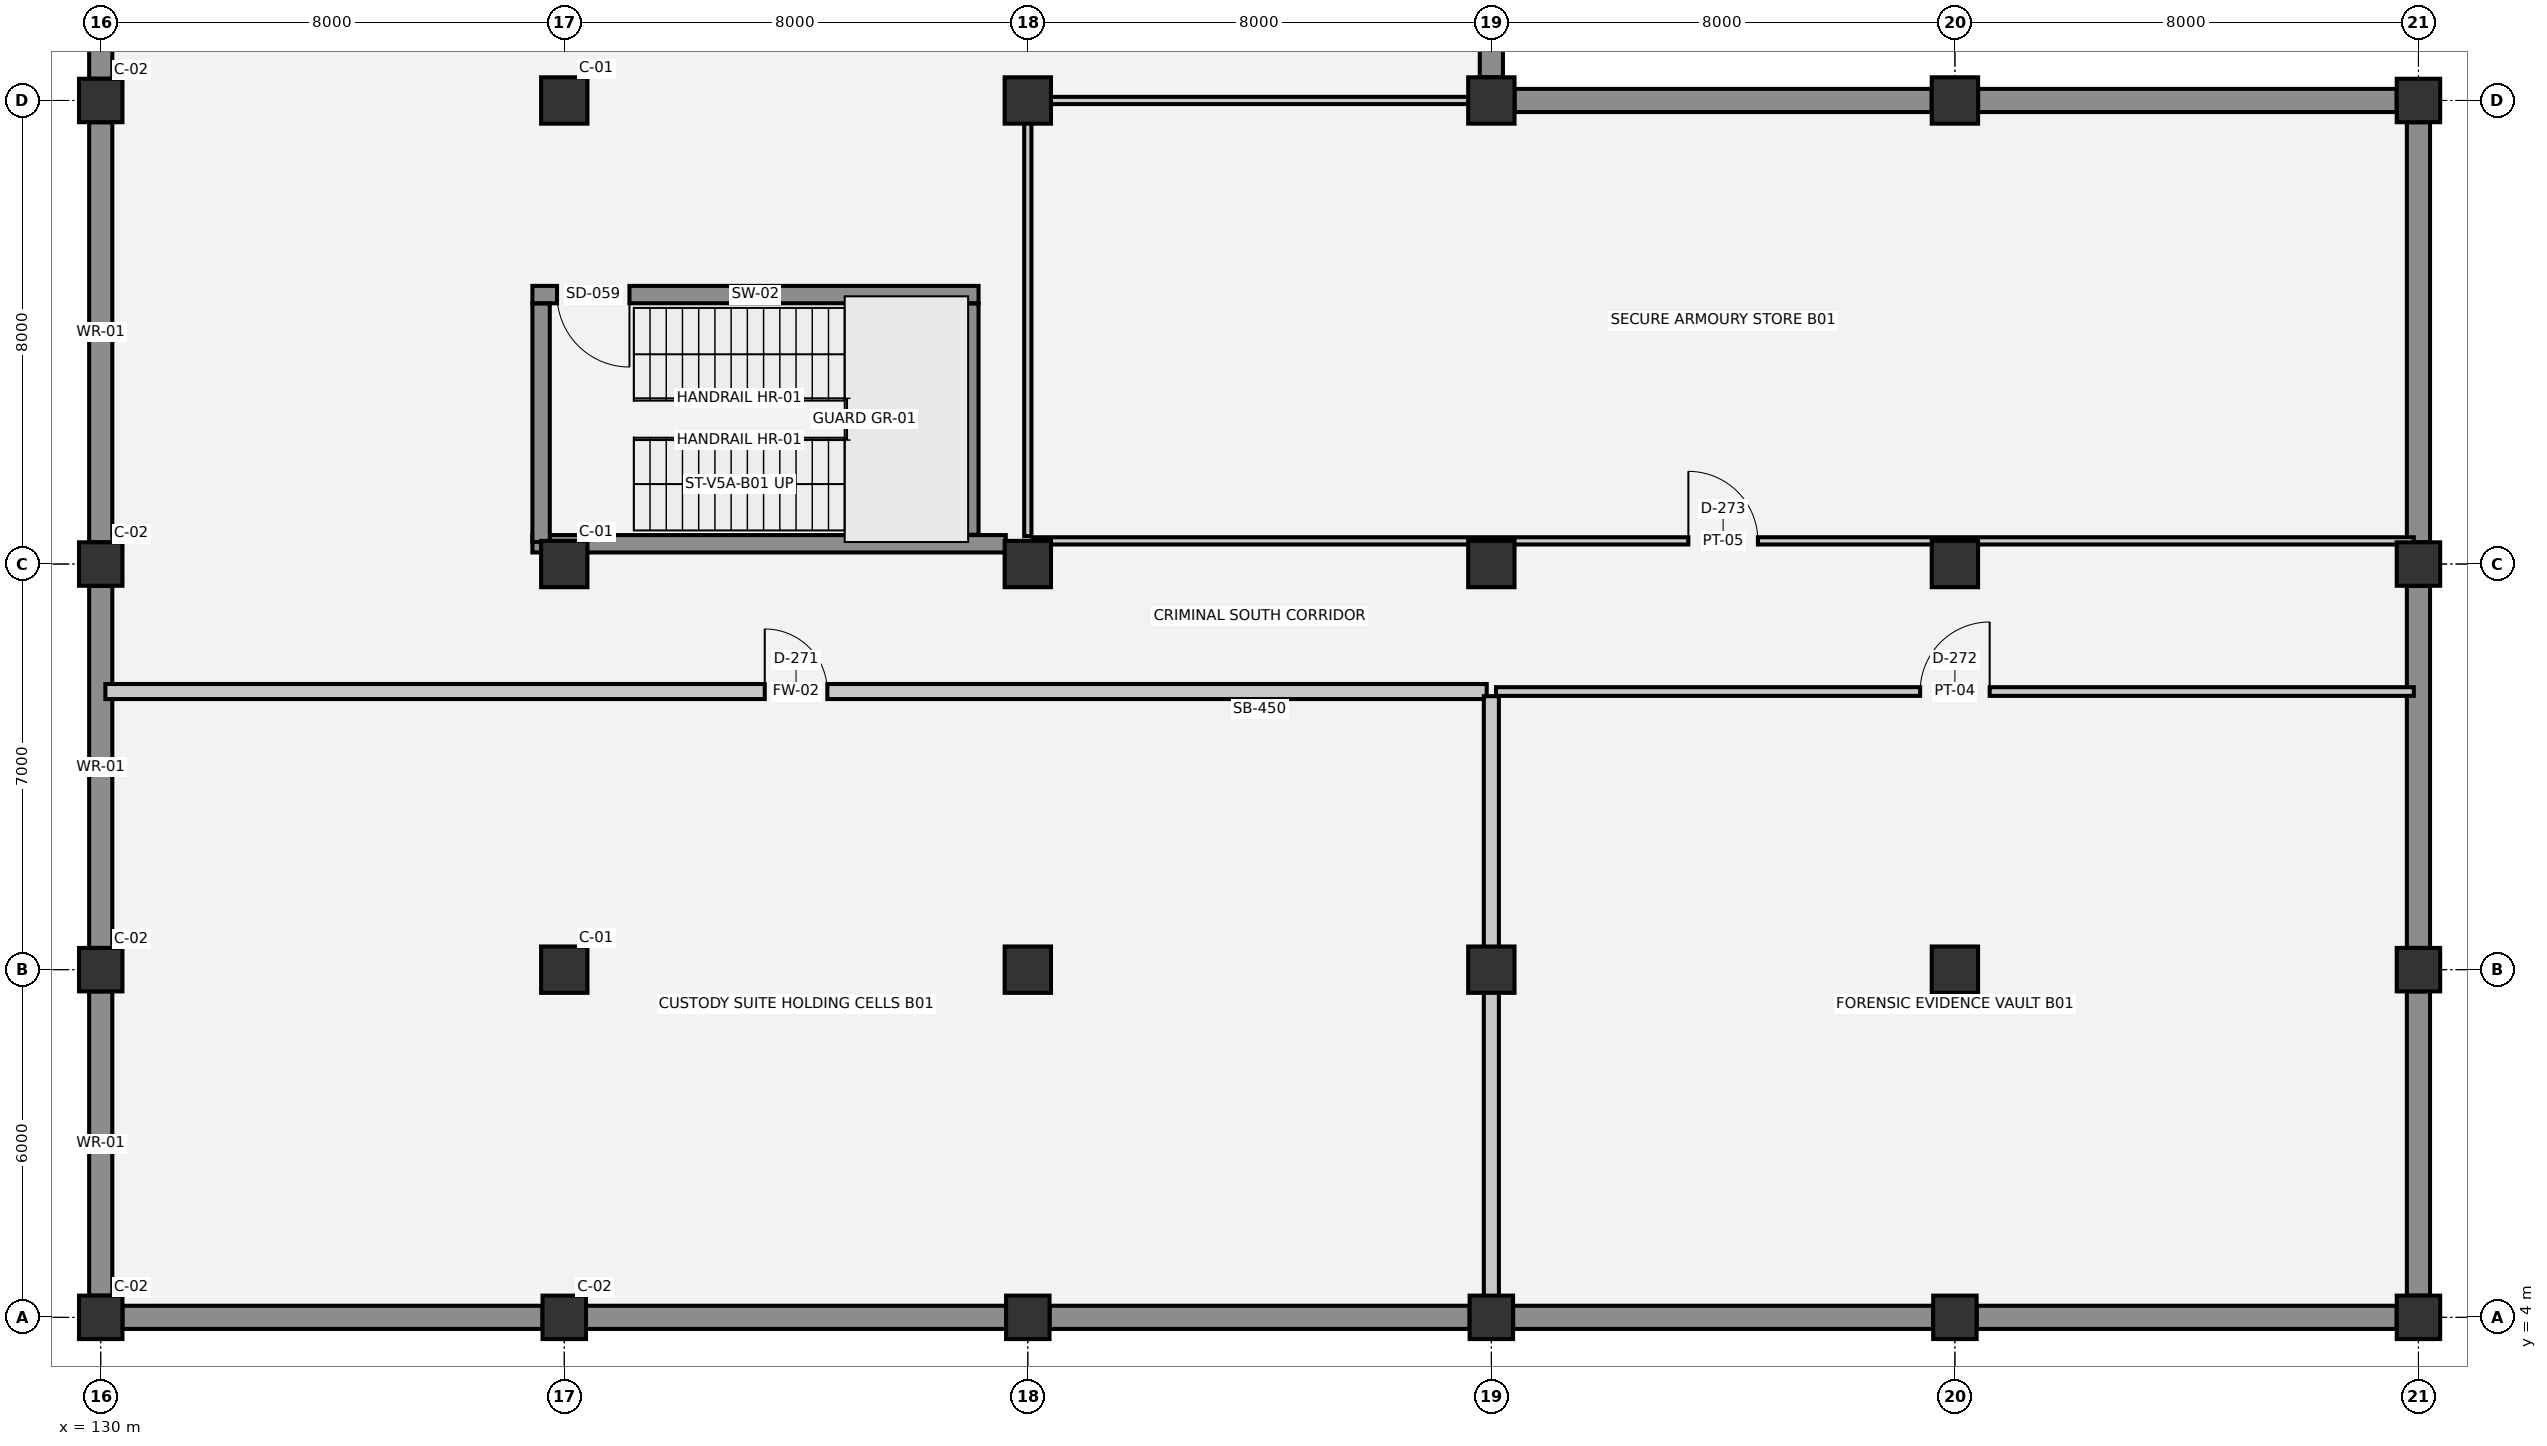
"""IFC4 building model, lengths in metres.
Left out: names, types, materials, properties, quantities, classifications, styles, units other than length and angle.
Written with IfcOpenShell. Run it as: python <this file> out.ifc"""

import sys

from ifc_helpers import new_model, si_unit, direction, frame, frame_2d, origin, origin_2d, place, context, subcontext, project, spatial, rectangle, extrude, element, fill, save


model = new_model("IFC4")
c1 = context("Model", 3, precision=1e-05, world=origin(), true_north=direction((0.0, 1.0)))
c2 = subcontext(c1, "Body", "Model", "MODEL_VIEW")
j1 = project(units=[si_unit("LENGTHUNIT", "METRE"), si_unit("PLANEANGLEUNIT", "RADIAN")], contexts=[c1])
p1 = place(None, origin())
s1 = spatial("IfcSite", under=j1, at=p1, CompositionType="ELEMENT")
p2 = place(p1, origin())
s2 = spatial("IfcBuilding", under=s1, at=p2, CompositionType="ELEMENT")
p3 = place(p2, frame((0.0, 0.0, -4.5)))
s3 = spatial("IfcBuildingStorey", under=s2, at=p3, CompositionType="ELEMENT", Elevation=-4.5)
for number, where, z_axis, x_axis in (
    (1, (130.0, 4.0, 0.0), (0.0, 0.0, 1.0), (1.0, 0.0, 0.0)),
    (2, (130.0, 10.0, 0.0), (0.0, 0.0, 1.0), (1.0, 0.0, 0.0)),
    (3, (130.0, 17.0, 0.0), (0.0, 0.0, 1.0), (1.0, 0.0, 0.0)),
    (4, (130.0, 25.0, 0.0), (0.0, 0.0, 1.0), (1.0, 0.0, 0.0)),
    (5, (138.0, 4.0, 0.0), (0.0, 0.0, 1.0), (1.0, 0.0, 0.0)),
):
    element("IfcColumn", number, at=place(p3, frame(where, z_axis=z_axis, x_axis=x_axis)), inside=s3, PredefinedType="COLUMN", context=c2, shape_type="SweptSolid", body=[
        extrude(rectangle(XDim=0.75, YDim=0.75, at=origin_2d()), origin(), (0.0, 0.0, 1.0), 4.5),
    ])
for number, where, z_axis, x_axis in (
    (6, (138.0, 10.0, 0.0), (0.0, 0.0, 1.0), (1.0, 0.0, 0.0)),
    (7, (138.0, 17.0, 0.0), (0.0, 0.0, 1.0), (1.0, 0.0, 0.0)),
    (8, (138.0, 25.0, 0.0), (0.0, 0.0, 1.0), (1.0, 0.0, 0.0)),
):
    element("IfcColumn", number, at=place(p3, frame(where, z_axis=z_axis, x_axis=x_axis)), inside=s3, PredefinedType="COLUMN", context=c2, shape_type="SweptSolid", body=[
        extrude(rectangle(XDim=0.8, YDim=0.8, at=origin_2d()), origin(), (0.0, 0.0, 1.0), 4.5),
    ])
p4 = place(p3, frame((146.0, 4.0, 0.0), z_axis=(0.0, 0.0, 1.0), x_axis=(1.0, 0.0, 0.0)))
e9 = element("IfcColumn", 9, at=p4, inside=s3, PredefinedType="COLUMN", context=c2, shape_type="SweptSolid", body=[
    extrude(rectangle(XDim=0.75, YDim=0.75, at=origin_2d()), origin(), (0.0, 0.0, 1.0), 4.5),
])
for number, where, z_axis, x_axis in (
    (10, (146.0, 10.0, 0.0), (0.0, 0.0, 1.0), (1.0, 0.0, 0.0)),
    (11, (146.0, 17.0, 0.0), (0.0, 0.0, 1.0), (1.0, 0.0, 0.0)),
    (12, (146.0, 25.0, 0.0), (0.0, 0.0, 1.0), (1.0, 0.0, 0.0)),
):
    element("IfcColumn", number, at=place(p3, frame(where, z_axis=z_axis, x_axis=x_axis)), inside=s3, PredefinedType="COLUMN", context=c2, shape_type="SweptSolid", body=[
        extrude(rectangle(XDim=0.8, YDim=0.8, at=origin_2d()), origin(), (0.0, 0.0, 1.0), 4.5),
    ])
p5 = place(p3, frame((154.0, 4.0, 0.0), z_axis=(0.0, 0.0, 1.0), x_axis=(1.0, 0.0, 0.0)))
e13 = element("IfcColumn", 13, at=p5, inside=s3, PredefinedType="COLUMN", context=c2, shape_type="SweptSolid", body=[
    extrude(rectangle(XDim=0.75, YDim=0.75, at=origin_2d()), origin(), (0.0, 0.0, 1.0), 4.5),
])
for number, where, z_axis, x_axis in (
    (14, (154.0, 10.0, 0.0), (0.0, 0.0, 1.0), (1.0, 0.0, 0.0)),
    (15, (154.0, 17.0, 0.0), (0.0, 0.0, 1.0), (1.0, 0.0, 0.0)),
    (16, (154.0, 25.0, 0.0), (0.0, 0.0, 1.0), (1.0, 0.0, 0.0)),
):
    element("IfcColumn", number, at=place(p3, frame(where, z_axis=z_axis, x_axis=x_axis)), inside=s3, PredefinedType="COLUMN", context=c2, shape_type="SweptSolid", body=[
        extrude(rectangle(XDim=0.8, YDim=0.8, at=origin_2d()), origin(), (0.0, 0.0, 1.0), 4.5),
    ])
p6 = place(p3, frame((162.0, 4.0, 0.0), z_axis=(0.0, 0.0, 1.0), x_axis=(1.0, 0.0, 0.0)))
e17 = element("IfcColumn", 17, at=p6, inside=s3, PredefinedType="COLUMN", context=c2, shape_type="SweptSolid", body=[
    extrude(rectangle(XDim=0.75, YDim=0.75, at=origin_2d()), origin(), (0.0, 0.0, 1.0), 4.5),
])
for number, where, z_axis, x_axis in (
    (18, (162.0, 10.0, 0.0), (0.0, 0.0, 1.0), (1.0, 0.0, 0.0)),
    (19, (162.0, 17.0, 0.0), (0.0, 0.0, 1.0), (1.0, 0.0, 0.0)),
    (20, (162.0, 25.0, 0.0), (0.0, 0.0, 1.0), (1.0, 0.0, 0.0)),
):
    element("IfcColumn", number, at=place(p3, frame(where, z_axis=z_axis, x_axis=x_axis)), inside=s3, PredefinedType="COLUMN", context=c2, shape_type="SweptSolid", body=[
        extrude(rectangle(XDim=0.8, YDim=0.8, at=origin_2d()), origin(), (0.0, 0.0, 1.0), 4.5),
    ])
for number, where, z_axis, x_axis in (
    (21, (170.0, 4.0, 0.0), (0.0, 0.0, 1.0), (1.0, 0.0, 0.0)),
    (22, (170.0, 10.0, 0.0), (0.0, 0.0, 1.0), (1.0, 0.0, 0.0)),
    (23, (170.0, 17.0, 0.0), (0.0, 0.0, 1.0), (1.0, 0.0, 0.0)),
    (24, (170.0, 25.0, 0.0), (0.0, 0.0, 1.0), (1.0, 0.0, 0.0)),
):
    element("IfcColumn", number, at=place(p3, frame(where, z_axis=z_axis, x_axis=x_axis)), inside=s3, PredefinedType="COLUMN", context=c2, shape_type="SweptSolid", body=[
        extrude(rectangle(XDim=0.75, YDim=0.75, at=origin_2d()), origin(), (0.0, 0.0, 1.0), 4.5),
    ])
p7 = place(p3, frame((130.0, 4.375, 0.0), z_axis=(0.0, 0.0, 1.0), x_axis=(0.0, 1.0, 0.0)))
e25 = element("IfcWall", 25, at=p7, inside=s3, PredefinedType="STANDARD", context=c2, shape_type="SweptSolid", body=[
    extrude(rectangle(XDim=5.25, YDim=0.4, at=frame_2d((2.625, 0.0))), origin(), (0.0, 0.0, 1.0), 4.2),
])
p8 = place(p3, frame((130.0, 10.375, 0.0), z_axis=(0.0, 0.0, 1.0), x_axis=(0.0, 1.0, 0.0)))
e26 = element("IfcWall", 26, at=p8, inside=s3, PredefinedType="STANDARD", context=c2, shape_type="SweptSolid", body=[
    extrude(rectangle(XDim=6.25, YDim=0.4, at=frame_2d((3.125, 0.0))), origin(), (0.0, 0.0, 1.0), 4.2),
])
p9 = place(p3, frame((130.0, 17.375, 0.0), z_axis=(0.0, 0.0, 1.0), x_axis=(0.0, 1.0, 0.0)))
e27 = element("IfcWall", 27, at=p9, inside=s3, PredefinedType="STANDARD", context=c2, shape_type="SweptSolid", body=[
    extrude(rectangle(XDim=7.25, YDim=0.4, at=frame_2d((3.625, 0.0))), origin(), (0.0, 0.0, 1.0), 4.2),
])
p10 = place(p3, frame((130.0, 25.375, 0.0), z_axis=(0.0, 0.0, 1.0), x_axis=(0.0, 1.0, 0.0)))
e28 = element("IfcWall", 28, at=p10, inside=s3, PredefinedType="STANDARD", context=c2, shape_type="SweptSolid", body=[
    extrude(rectangle(XDim=6.25, YDim=0.4, at=frame_2d((3.125, 0.0))), origin(), (0.0, 0.0, 1.0), 4.2),
])
p11 = place(p3, frame((154.0, 31.6, 0.0), z_axis=(0.0, 0.0, 1.0), x_axis=(0.0, -1.0, 0.0)))
e29 = element("IfcWall", 29, at=p11, inside=s3, PredefinedType="STANDARD", context=c2, shape_type="SweptSolid", body=[
    extrude(rectangle(XDim=6.2, YDim=0.4, at=frame_2d((3.1, 0.0))), origin(), (0.0, 0.0, 1.0), 4.2),
])
p12 = place(p3, frame((154.4, 25.0, 0.0), z_axis=(0.0, 0.0, 1.0), x_axis=(1.0, 0.0, 0.0)))
e30 = element("IfcWall", 30, at=p12, inside=s3, PredefinedType="STANDARD", context=c2, shape_type="SweptSolid", body=[
    extrude(rectangle(XDim=7.2, YDim=0.4, at=frame_2d((3.6, 0.0))), origin(), (0.0, 0.0, 1.0), 4.2),
])
p13 = place(p3, frame((162.4, 25.0, 0.0), z_axis=(0.0, 0.0, 1.0), x_axis=(1.0, 0.0, 0.0)))
e31 = element("IfcWall", 31, at=p13, inside=s3, PredefinedType="STANDARD", context=c2, shape_type="SweptSolid", body=[
    extrude(rectangle(XDim=7.225, YDim=0.4, at=frame_2d((3.613, 0.0))), origin(), (0.0, 0.0, 1.0), 4.2),
])
p14 = place(p3, frame((170.0, 24.625, 0.0), z_axis=(0.0, 0.0, 1.0), x_axis=(0.0, -1.0, 0.0)))
e32 = element("IfcWall", 32, at=p14, inside=s3, PredefinedType="STANDARD", context=c2, shape_type="SweptSolid", body=[
    extrude(rectangle(XDim=7.25, YDim=0.4, at=frame_2d((3.625, 0.0))), origin(), (0.0, 0.0, 1.0), 4.2),
])
p15 = place(p3, frame((170.0, 16.625, 0.0), z_axis=(0.0, 0.0, 1.0), x_axis=(0.0, -1.0, 0.0)))
e33 = element("IfcWall", 33, at=p15, inside=s3, PredefinedType="STANDARD", context=c2, shape_type="SweptSolid", body=[
    extrude(rectangle(XDim=6.25, YDim=0.4, at=frame_2d((3.125, 0.0))), origin(), (0.0, 0.0, 1.0), 4.2),
])
p16 = place(p3, frame((170.0, 9.625, 0.0), z_axis=(0.0, 0.0, 1.0), x_axis=(0.0, -1.0, 0.0)))
e34 = element("IfcWall", 34, at=p16, inside=s3, PredefinedType="STANDARD", context=c2, shape_type="SweptSolid", body=[
    extrude(rectangle(XDim=5.25, YDim=0.4, at=frame_2d((2.625, 0.0))), origin(), (0.0, 0.0, 1.0), 4.2),
])
for number, where, z_axis, x_axis in (
    (35, (169.625, 4.0, 0.0), (0.0, 0.0, 1.0), (-1.0, 0.0, 0.0)),
    (36, (161.625, 4.0, 0.0), (0.0, 0.0, 1.0), (-1.0, 0.0, 0.0)),
    (37, (153.625, 4.0, 0.0), (0.0, 0.0, 1.0), (-1.0, 0.0, 0.0)),
    (38, (145.625, 4.0, 0.0), (0.0, 0.0, 1.0), (-1.0, 0.0, 0.0)),
    (39, (137.625, 4.0, 0.0), (0.0, 0.0, 1.0), (-1.0, 0.0, 0.0)),
):
    element("IfcWall", number, at=place(p3, frame(where, z_axis=z_axis, x_axis=x_axis)), inside=s3, PredefinedType="STANDARD", context=c2, shape_type="SweptSolid", body=[
        extrude(rectangle(XDim=7.25, YDim=0.4, at=frame_2d((3.625, 0.0))), origin(), (0.0, 0.0, 1.0), 4.2),
    ])
p17 = place(p3, frame((145.15, 21.65, 0.0), z_axis=(0.0, 0.0, 1.0), x_axis=(-1.0, 0.0, 0.0)))
e40 = element("IfcWall", 40, at=p17, inside=s3, PredefinedType="SHEAR", context=c2, shape_type="SweptSolid", body=[
    extrude(rectangle(XDim=7.7, YDim=0.3, at=frame_2d((3.85, 0.0))), origin(), (0.0, 0.0, 1.0), 4.2),
])
p18 = place(p17, frame((6.025, 0.0, 0.0)))
e41 = element("IfcOpeningElement", 41, at=p18, cuts=e40, PredefinedType="OPENING", context=c2, shape_type="SweptSolid", body=[
    extrude(rectangle(XDim=1.25, YDim=2.15, at=frame_2d((0.625, 1.075))), frame((0.0, 0.16, 0.0), z_axis=(0.0, -1.0, 0.0), x_axis=(1.0, 0.0, 0.0)), (0.0, 0.0, 1.0), 0.32),
])
p19 = place(p3, frame((137.45, 17.35, 0.0), z_axis=(0.0, 0.0, 1.0), x_axis=(1.0, 0.0, 0.0)))
e42 = element("IfcWall", 42, at=p19, inside=s3, PredefinedType="SHEAR", context=c2, shape_type="SweptSolid", body=[
    extrude(rectangle(XDim=8.17, YDim=0.3, at=frame_2d((4.085, 0.0))), origin(), (0.0, 0.0, 1.0), 4.2),
])
p20 = place(p3, frame((137.6, 21.495, 0.0), z_axis=(0.0, 0.0, 1.0), x_axis=(0.0, -1.0, 0.0)))
e43 = element("IfcWall", 43, at=p20, inside=s3, PredefinedType="SHEAR", context=c2, shape_type="SweptSolid", body=[
    extrude(rectangle(XDim=4.115, YDim=0.3, at=frame_2d((2.058, 0.0))), origin(), (0.0, 0.0, 1.0), 4.2),
])
p21 = place(p3, frame((145.0, 17.505, 0.0), z_axis=(0.0, 0.0, 1.0), x_axis=(0.0, 1.0, 0.0)))
e44 = element("IfcWall", 44, at=p21, inside=s3, PredefinedType="SHEAR", context=c2, shape_type="SweptSolid", body=[
    extrude(rectangle(XDim=3.99, YDim=0.3, at=frame_2d((1.995, 0.0))), origin(), (0.0, 0.0, 1.0), 4.2),
])
p22 = place(p3, frame((130.08, 14.8, 0.0), z_axis=(0.0, 0.0, 1.0), x_axis=(1.0, 0.0, 0.0)))
e45 = element("IfcWall", 45, at=p22, inside=s3, PredefinedType="SOLIDWALL", context=c2, shape_type="SweptSolid", body=[
    extrude(rectangle(XDim=23.84, YDim=0.26, at=frame_2d((11.92, 0.0))), origin(), (0.0, 0.0, 1.0), 4.14),
])
p23 = place(p22, frame((11.38, 0.0, 0.0)))
e46 = element("IfcOpeningElement", 46, at=p23, cuts=e45, PredefinedType="OPENING", context=c2, shape_type="SweptSolid", body=[
    extrude(rectangle(XDim=1.08, YDim=2.1, at=frame_2d((0.54, 1.05))), frame((0.0, 0.14, 0.0), z_axis=(0.0, -1.0, 0.0), x_axis=(1.0, 0.0, 0.0)), (0.0, 0.0, 1.0), 0.28),
])
p24 = place(p3, frame((154.08, 14.8, 0.0), z_axis=(0.0, 0.0, 1.0), x_axis=(1.0, 0.0, 0.0)))
e47 = element("IfcWall", 47, at=p24, inside=s3, PredefinedType="PARTITIONING", context=c2, shape_type="SweptSolid", body=[
    extrude(rectangle(XDim=15.84, YDim=0.15, at=frame_2d((7.92, 0.0))), origin(), (0.0, 0.0, 1.0), 4.14),
])
p25 = place(p24, frame((7.32, 0.0, 0.0)))
e48 = element("IfcOpeningElement", 48, at=p25, cuts=e47, PredefinedType="OPENING", context=c2, shape_type="SweptSolid", body=[
    extrude(rectangle(XDim=1.2, YDim=2.15, at=frame_2d((0.6, 1.075))), frame((0.0, 0.085, 0.0), z_axis=(0.0, -1.0, 0.0), x_axis=(1.0, 0.0, 0.0)), (0.0, 0.0, 1.0), 0.17),
])
p26 = place(p3, frame((146.08, 17.4, 0.0), z_axis=(0.0, 0.0, 1.0), x_axis=(1.0, 0.0, 0.0)))
e49 = element("IfcWall", 49, at=p26, inside=s3, PredefinedType="PARTITIONING", context=c2, shape_type="SweptSolid", body=[
    extrude(rectangle(XDim=23.84, YDim=0.125, at=frame_2d((11.92, 0.0))), origin(), (0.0, 0.0, 1.0), 4.14),
])
p27 = place(p26, frame((11.32, 0.0, 0.0)))
e50 = element("IfcOpeningElement", 50, at=p27, cuts=e49, PredefinedType="OPENING", context=c2, shape_type="SweptSolid", body=[
    extrude(rectangle(XDim=1.2, YDim=2.15, at=frame_2d((0.6, 1.075))), frame((0.0, 0.073, 0.0), z_axis=(0.0, -1.0, 0.0), x_axis=(1.0, 0.0, 0.0)), (0.0, 0.0, 1.0), 0.145),
])
p28 = place(p3, frame((146.08, 25.0, 0.0), z_axis=(0.0, 0.0, 1.0), x_axis=(1.0, 0.0, 0.0)))
e51 = element("IfcWall", 51, at=p28, inside=s3, PredefinedType="PARTITIONING", context=c2, shape_type="SweptSolid", body=[
    extrude(rectangle(XDim=7.52, YDim=0.125, at=frame_2d((3.76, 0.0))), origin(), (0.0, 0.0, 1.0), 3.45),
])
p29 = place(p3, frame((146.0, 17.48, 0.0), z_axis=(0.0, 0.0, 1.0), x_axis=(0.0, 1.0, 0.0)))
e52 = element("IfcWall", 52, at=p29, inside=s3, PredefinedType="PARTITIONING", context=c2, shape_type="SweptSolid", body=[
    extrude(rectangle(XDim=7.44, YDim=0.125, at=frame_2d((3.72, 0.0))), origin(), (0.0, 0.0, 1.0), 3.3),
])
p30 = place(p3, frame((154.0, 4.08, 0.0), z_axis=(0.0, 0.0, 1.0), x_axis=(0.0, 1.0, 0.0)))
e53 = element("IfcWall", 53, at=p30, inside=s3, PredefinedType="SOLIDWALL", context=c2, shape_type="SweptSolid", body=[
    extrude(rectangle(XDim=10.64, YDim=0.26, at=frame_2d((5.32, 0.0))), origin(), (0.0, 0.0, 1.0), 3.55),
])
p31 = place(p18, origin())
e54 = element("IfcDoor", 54, at=p31, inside=s3, OperationType="SINGLE_SWING_LEFT", PredefinedType="DOOR", context=c2, shape_type="SweptSolid", body=[
    extrude(rectangle(XDim=1.25, YDim=2.15, at=frame_2d((0.625, 1.075))), frame((0.0, 0.025, 0.0), z_axis=(0.0, -1.0, 0.0), x_axis=(1.0, 0.0, 0.0)), (0.0, 0.0, 1.0), 0.05),
])
fill(e41, e54)
p32 = place(p23, origin())
e55 = element("IfcDoor", 55, at=p32, inside=s3, OperationType="SINGLE_SWING_LEFT", PredefinedType="DOOR", context=c2, shape_type="SweptSolid", body=[
    extrude(rectangle(XDim=1.08, YDim=2.1, at=frame_2d((0.54, 1.05))), frame((0.0, 0.025, 0.0), z_axis=(0.0, -1.0, 0.0), x_axis=(1.0, 0.0, 0.0)), (0.0, 0.0, 1.0), 0.05),
])
fill(e46, e55)
p33 = place(p25, origin())
e56 = element("IfcDoor", 56, at=p33, inside=s3, OperationType="SINGLE_SWING_RIGHT", PredefinedType="DOOR", context=c2, shape_type="SweptSolid", body=[
    extrude(rectangle(XDim=1.2, YDim=2.15, at=frame_2d((0.6, 1.075))), frame((0.0, 0.025, 0.0), z_axis=(0.0, -1.0, 0.0), x_axis=(1.0, 0.0, 0.0)), (0.0, 0.0, 1.0), 0.05),
])
fill(e48, e56)
p34 = place(p27, origin())
e57 = element("IfcDoor", 57, at=p34, inside=s3, OperationType="SINGLE_SWING_LEFT", PredefinedType="DOOR", context=c2, shape_type="SweptSolid", body=[
    extrude(rectangle(XDim=1.2, YDim=2.15, at=frame_2d((0.6, 1.075))), frame((0.0, 0.025, 0.0), z_axis=(0.0, -1.0, 0.0), x_axis=(1.0, 0.0, 0.0)), (0.0, 0.0, 1.0), 0.05),
])
fill(e50, e57)
save(model, sys.argv[1])
